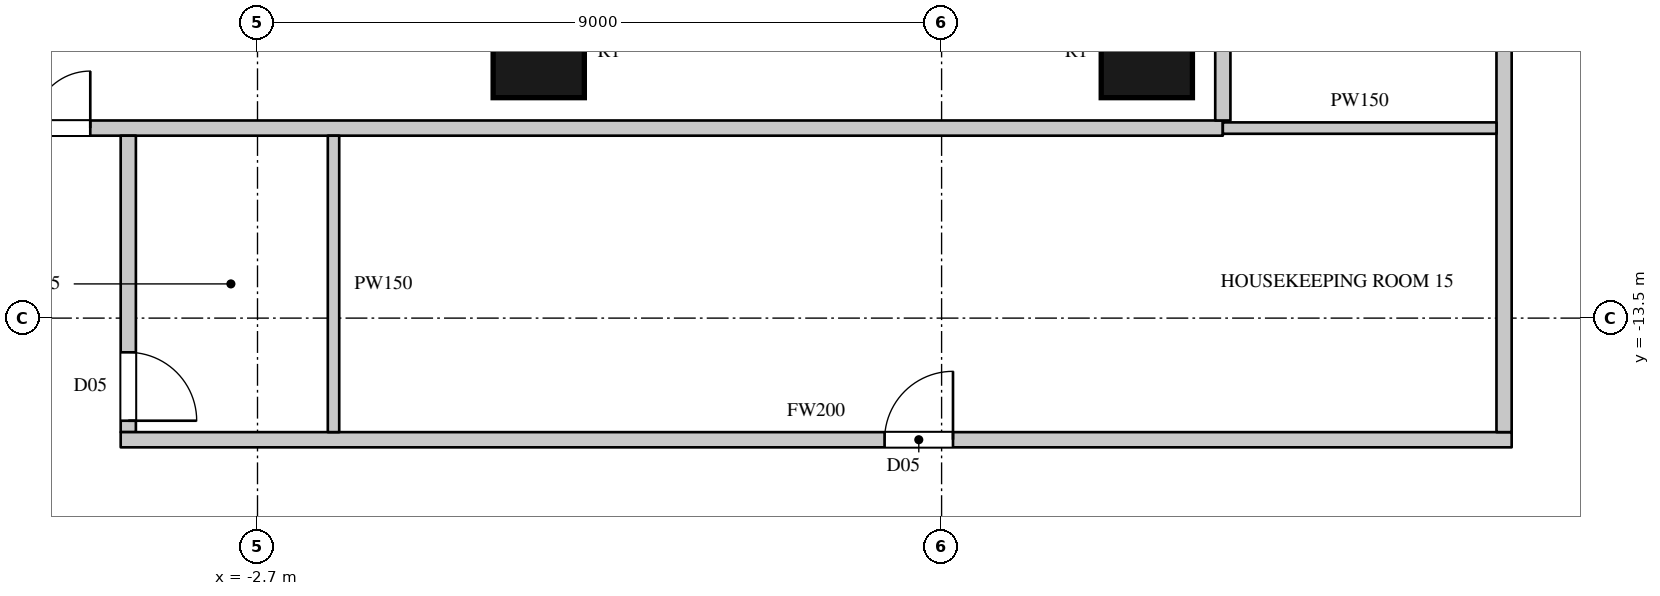
"""IFC4 building model, lengths in metres.
Left out: names, types, materials, properties, quantities, classifications, styles, units other than length and angle.
Written with IfcOpenShell. Run it as: python <this file> out.ifc"""

import sys

from ifc_helpers import new_model, si_unit, direction, frame, frame_2d, origin, origin_2d, place, context, subcontext, project, spatial, rectangle, circle, extrude, element, fill, save


model = new_model("IFC4")
c1 = context("Model", 3, precision=1e-05, world=origin(), true_north=direction((0.0, 1.0)))
c2 = subcontext(c1, "Body", "Model", "MODEL_VIEW")
j1 = project(units=[si_unit("LENGTHUNIT", "METRE"), si_unit("PLANEANGLEUNIT", "RADIAN")], contexts=[c1])
p1 = place(None, origin())
s1 = spatial("IfcSite", under=j1, at=p1, CompositionType="ELEMENT")
p2 = place(p1, origin())
s2 = spatial("IfcBuilding", under=s1, at=p2, CompositionType="ELEMENT")
p3 = place(p2, frame((0.0, 0.0, 84.3)))
s3 = spatial("IfcBuildingStorey", under=s2, at=p3, CompositionType="ELEMENT", Elevation=84.3)
for number, where, z_axis, x_axis in (
    (1, (1.0, -10.0, 0.0), (0.0, 0.0, 1.0), (1.0, 0.0, 0.0)),
    (2, (9.0, -10.0, 0.0), (0.0, 0.0, 1.0), (1.0, 0.0, 0.0)),
):
    element("IfcColumn", number, at=place(p3, frame(where, z_axis=z_axis, x_axis=x_axis)), inside=s3, PredefinedType="COLUMN", context=c2, shape_type="SweptSolid", body=[
        extrude(circle(Radius=0.6, at=origin_2d()), origin(), (0.0, 0.0, 1.0), 3.6),
    ])
p4 = place(p3, frame((-8.1, -11.0, 0.0), z_axis=(0.0, 0.0, 1.0), x_axis=(1.0, 0.0, 0.0)))
e3 = element("IfcWall", 3, at=p4, inside=s3, PredefinedType="PARTITIONING", context=c2, shape_type="SweptSolid", body=[
    extrude(rectangle(XDim=18.1, YDim=0.2, at=frame_2d((9.05, 0.0))), origin(), (0.0, 0.0, 1.0), 3.3),
])
p5 = place(p4, frame((1.7, 0.0, 0.0)))
e4 = element("IfcOpeningElement", 4, at=p5, cuts=e3, PredefinedType="OPENING", context=c2, shape_type="SweptSolid", body=[
    extrude(rectangle(XDim=1.5, YDim=2.2, at=frame_2d((0.75, 1.1))), frame((0.0, 0.11, 0.0), z_axis=(0.0, -1.0, 0.0), x_axis=(1.0, 0.0, 0.0)), (0.0, 0.0, 1.0), 0.22),
])
p6 = place(p3, frame((-4.4, -15.0, 0.0), z_axis=(0.0, 0.0, 1.0), x_axis=(0.0, 1.0, 0.0)))
e5 = element("IfcWall", 5, at=p6, inside=s3, PredefinedType="PARTITIONING", context=c2, shape_type="SweptSolid", body=[
    extrude(rectangle(XDim=3.9, YDim=0.2, at=frame_2d((1.95, 0.0))), origin(), (0.0, 0.0, 1.0), 3.3),
])
p7 = place(p6, frame((0.15, 0.0, 0.0)))
e6 = element("IfcOpeningElement", 6, at=p7, cuts=e5, PredefinedType="OPENING", context=c2, shape_type="SweptSolid", body=[
    extrude(rectangle(XDim=0.9, YDim=2.2, at=frame_2d((0.45, 1.1))), frame((0.0, 0.11, 0.0), z_axis=(0.0, -1.0, 0.0), x_axis=(1.0, 0.0, 0.0)), (0.0, 0.0, 1.0), 0.22),
])
p8 = place(p3, frame((-4.5, -15.1, 0.0), z_axis=(0.0, 0.0, 1.0), x_axis=(1.0, 0.0, 0.0)))
e7 = element("IfcWall", 7, at=p8, inside=s3, PredefinedType="PARTITIONING", context=c2, shape_type="SweptSolid", body=[
    extrude(rectangle(XDim=18.3, YDim=0.2, at=frame_2d((9.15, 0.0))), origin(), (0.0, 0.0, 1.0), 3.3),
])
p9 = place(p8, frame((10.05, 0.0, 0.0)))
e8 = element("IfcOpeningElement", 8, at=p9, cuts=e7, PredefinedType="OPENING", context=c2, shape_type="SweptSolid", body=[
    extrude(rectangle(XDim=0.9, YDim=2.2, at=frame_2d((0.45, 1.1))), frame((0.0, 0.11, 0.0), z_axis=(0.0, -1.0, 0.0), x_axis=(1.0, 0.0, 0.0)), (0.0, 0.0, 1.0), 0.22),
])
p10 = place(p3, frame((10.0, -10.9, 0.0), z_axis=(0.0, 0.0, 1.0), x_axis=(0.0, 1.0, 0.0)))
e9 = element("IfcWall", 9, at=p10, inside=s3, PredefinedType="PARTITIONING", context=c2, shape_type="SweptSolid", body=[
    extrude(rectangle(XDim=21.8, YDim=0.2, at=frame_2d((10.9, 0.0))), origin(), (0.0, 0.0, 1.0), 3.3),
])
p11 = place(p10, frame((15.9, 0.0, 0.0)))
e10 = element("IfcOpeningElement", 10, at=p11, cuts=e9, PredefinedType="OPENING", context=c2, shape_type="SweptSolid", body=[
    extrude(rectangle(XDim=1.5, YDim=2.2, at=frame_2d((0.75, 1.1))), frame((0.0, 0.11, 0.0), z_axis=(0.0, -1.0, 0.0), x_axis=(1.0, 0.0, 0.0)), (0.0, 0.0, 1.0), 0.22),
])
p12 = place(p10, frame((8.75, 0.0, 0.0)))
e11 = element("IfcOpeningElement", 11, at=p12, cuts=e9, PredefinedType="OPENING", context=c2, shape_type="SweptSolid", body=[
    extrude(rectangle(XDim=1.5, YDim=2.2, at=frame_2d((0.75, 1.1))), frame((0.0, 0.11, 0.0), z_axis=(0.0, -1.0, 0.0), x_axis=(1.0, 0.0, 0.0)), (0.0, 0.0, 1.0), 0.22),
])
p13 = place(p3, frame((13.7, -15.0, 0.0), z_axis=(0.0, 0.0, 1.0), x_axis=(0.0, 1.0, 0.0)))
e12 = element("IfcWall", 12, at=p13, inside=s3, PredefinedType="PARTITIONING", context=c2, shape_type="SweptSolid", body=[
    extrude(rectangle(XDim=7.2, YDim=0.2, at=frame_2d((3.6, 0.0))), origin(), (0.0, 0.0, 1.0), 3.3),
])
p14 = place(p3, frame((-1.7, -15.0, 0.0), z_axis=(0.0, 0.0, 1.0), x_axis=(0.0, 1.0, 0.0)))
e13 = element("IfcWall", 13, at=p14, inside=s3, PredefinedType="PARTITIONING", context=c2, shape_type="SweptSolid", body=[
    extrude(rectangle(XDim=3.9, YDim=0.15, at=frame_2d((1.95, 0.0))), origin(), (0.0, 0.0, 1.0), 3.3),
])
p15 = place(p3, frame((10.0, -11.0, 0.0), z_axis=(0.0, 0.0, 1.0), x_axis=(1.0, 0.0, 0.0)))
e14 = element("IfcWall", 14, at=p15, inside=s3, PredefinedType="PARTITIONING", context=c2, shape_type="SweptSolid", body=[
    extrude(rectangle(XDim=3.6, YDim=0.15, at=frame_2d((1.8, 0.0))), origin(), (0.0, 0.0, 1.0), 3.3),
])
p16 = place(p5, origin())
e15 = element("IfcDoor", 15, at=p16, inside=s3, OperationType="DOUBLE_DOOR_SINGLE_SWING", PredefinedType="DOOR", context=c2, shape_type="SweptSolid", body=[
    extrude(rectangle(XDim=1.5, YDim=2.2, at=frame_2d((0.75, 1.1))), frame((0.0, 0.025, 0.0), z_axis=(0.0, -1.0, 0.0), x_axis=(1.0, 0.0, 0.0)), (0.0, 0.0, 1.0), 0.05),
])
fill(e4, e15)
p17 = place(p7, origin())
e16 = element("IfcDoor", 16, at=p17, inside=s3, OperationType="SINGLE_SWING_RIGHT", PredefinedType="DOOR", context=c2, shape_type="SweptSolid", body=[
    extrude(rectangle(XDim=0.9, YDim=2.2, at=frame_2d((0.45, 1.1))), frame((0.0, 0.025, 0.0), z_axis=(0.0, -1.0, 0.0), x_axis=(1.0, 0.0, 0.0)), (0.0, 0.0, 1.0), 0.05),
])
fill(e6, e16)
p18 = place(p9, origin())
e17 = element("IfcDoor", 17, at=p18, inside=s3, OperationType="SINGLE_SWING_RIGHT", PredefinedType="DOOR", context=c2, shape_type="SweptSolid", body=[
    extrude(rectangle(XDim=0.9, YDim=2.2, at=frame_2d((0.45, 1.1))), frame((0.0, 0.025, 0.0), z_axis=(0.0, -1.0, 0.0), x_axis=(1.0, 0.0, 0.0)), (0.0, 0.0, 1.0), 0.05),
])
fill(e8, e17)
save(model, sys.argv[1])
